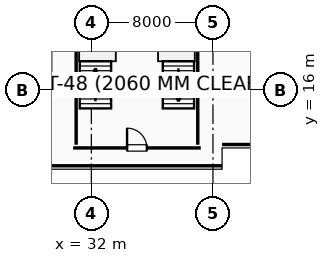
"""IFC4 building model, lengths in metres.
Left out: names, types, materials, properties, quantities, classifications, styles, units other than length and angle.
Written with IfcOpenShell. Run it as: python <this file> out.ifc"""

import sys

from ifc_helpers import new_model, si_unit, direction, frame, frame_2d, origin, origin_2d, place, context, subcontext, project, spatial, rectangle, i_section, extrude, element, fill, save


model = new_model("IFC4")
c1 = context("Model", 3, precision=1e-05, world=origin(), true_north=direction((0.0, 1.0)))
c2 = subcontext(c1, "Body", "Model", "MODEL_VIEW")
j1 = project(units=[si_unit("LENGTHUNIT", "METRE"), si_unit("PLANEANGLEUNIT", "RADIAN")], contexts=[c1])
p1 = place(None, origin())
s1 = spatial("IfcSite", under=j1, at=p1, CompositionType="ELEMENT")
p2 = place(p1, origin())
s2 = spatial("IfcBuilding", under=s1, at=p2, CompositionType="ELEMENT")
p3 = place(p2, frame((0.0, 0.0, -4.8)))
s3 = spatial("IfcBuildingStorey", under=s2, at=p3, CompositionType="ELEMENT", Elevation=-4.8)
p4 = place(p3, frame((40.0, 16.0, 0.0), z_axis=(0.0, 0.0, 1.0), x_axis=(1.0, 0.0, 0.0)))
e1 = element("IfcColumn", 1, at=p4, inside=s3, PredefinedType="COLUMN", context=c2, shape_type="SweptSolid", body=[
    extrude(rectangle(XDim=0.9, YDim=0.9, at=origin_2d()), origin(), (0.0, 0.0, 1.0), 4.8),
])
for number, where, z_axis, x_axis in (
    (2, (33.52, 17.98, 0.0), (0.0, 0.0, 1.0), (1.0, 0.0, 0.0)),
    (3, (36.48, 17.98, 0.0), (0.0, 0.0, 1.0), (1.0, 0.0, 0.0)),
):
    element("IfcColumn", number, at=place(p3, frame(where, z_axis=z_axis, x_axis=x_axis)), inside=s3, PredefinedType="COLUMN", context=c2, shape_type="SweptSolid", body=[
        extrude(i_section(OverallWidth=0.25, OverallDepth=0.35, WebThickness=0.01, FlangeThickness=0.012, FilletRadius=0.012, at=origin_2d()), origin(), (0.0, 0.0, 1.0), 4.8),
    ])
p5 = place(p3, frame((108.0, 12.425, 0.0), z_axis=(0.0, 0.0, 1.0), x_axis=(-1.0, 0.0, 0.0)))
e4 = element("IfcWall", 4, at=p5, inside=s3, PredefinedType="USERDEFINED", context=c2, shape_type="SweptSolid", body=[
    extrude(rectangle(XDim=67.4, YDim=0.45, at=frame_2d((33.7, 0.0))), origin(), (0.0, 0.0, 1.0), 4.38),
])
p6 = place(p3, frame((40.6, 11.025, 0.0), z_axis=(0.0, 0.0, 1.0), x_axis=(-1.0, 0.0, 0.0)))
e5 = element("IfcWall", 5, at=p6, inside=s3, PredefinedType="USERDEFINED", context=c2, shape_type="SweptSolid", body=[
    extrude(rectangle(XDim=15.2, YDim=0.45, at=frame_2d((7.6, 0.0))), origin(), (0.0, 0.0, 1.0), 4.38),
])
p7 = place(p3, frame((30.8, 12.2, 0.0), z_axis=(0.0, 0.0, 1.0), x_axis=(1.0, 0.0, 0.0)))
e6 = element("IfcWall", 6, at=p7, inside=s3, PredefinedType="SHEAR", context=c2, shape_type="SweptSolid", body=[
    extrude(rectangle(XDim=8.4, YDim=0.4, at=frame_2d((4.2, 0.0))), origin(), (0.0, 0.0, 1.0), 4.48),
])
p8 = place(p7, frame((3.55, 0.0, 0.0)))
e7 = element("IfcOpeningElement", 7, at=p8, cuts=e6, PredefinedType="OPENING", context=c2, shape_type="SweptSolid", body=[
    extrude(rectangle(XDim=1.3, YDim=2.15, at=frame_2d((0.65, 1.075))), frame((0.0, 0.21, 0.0), z_axis=(0.0, -1.0, 0.0), x_axis=(1.0, 0.0, 0.0)), (0.0, 0.0, 1.0), 0.42),
])
for number, where, z_axis, x_axis in (
    (8, (39.0, 12.41, 0.0), (0.0, 0.0, 1.0), (0.0, 1.0, 0.0)),
    (9, (31.0, 20.79, 0.0), (0.0, 0.0, 1.0), (0.0, -1.0, 0.0)),
):
    element("IfcWall", number, at=place(p3, frame(where, z_axis=z_axis, x_axis=x_axis)), inside=s3, PredefinedType="SHEAR", context=c2, shape_type="SweptSolid", body=[
        extrude(rectangle(XDim=8.38, YDim=0.4, at=frame_2d((4.19, 0.0))), origin(), (0.0, 0.0, 1.0), 4.48),
    ])
p9 = place(p3, frame((25.75, 16.875, 0.0), z_axis=(0.0, 0.0, 1.0), x_axis=(1.0, 0.0, 0.0)))
e10 = element("IfcWall", 10, at=p9, inside=s3, PredefinedType="STANDARD", context=c2, shape_type="SweptSolid", body=[
    extrude(rectangle(XDim=3.7, YDim=0.25, at=frame_2d((1.85, 0.0))), origin(), (0.0, 0.0, 1.0), 4.47),
])
p10 = place(p3, frame((29.325, 17.01, 0.0), z_axis=(0.0, 0.0, 1.0), x_axis=(0.0, 1.0, 0.0)))
e11 = element("IfcWall", 11, at=p10, inside=s3, PredefinedType="STANDARD", context=c2, shape_type="SweptSolid", body=[
    extrude(rectangle(XDim=4.38, YDim=0.25, at=frame_2d((2.19, 0.0))), origin(), (0.0, 0.0, 1.0), 4.47),
])
p11 = place(p8, origin())
e12 = element("IfcDoor", 12, at=p11, inside=s3, OperationType="SINGLE_SWING_LEFT", PredefinedType="DOOR", context=c2, shape_type="SweptSolid", body=[
    extrude(rectangle(XDim=1.3, YDim=2.15, at=frame_2d((0.65, 1.075))), frame((0.0, 0.025, 0.0), z_axis=(0.0, -1.0, 0.0), x_axis=(1.0, 0.0, 0.0)), (0.0, 0.0, 1.0), 0.05),
])
fill(e7, e12)
save(model, sys.argv[1])
